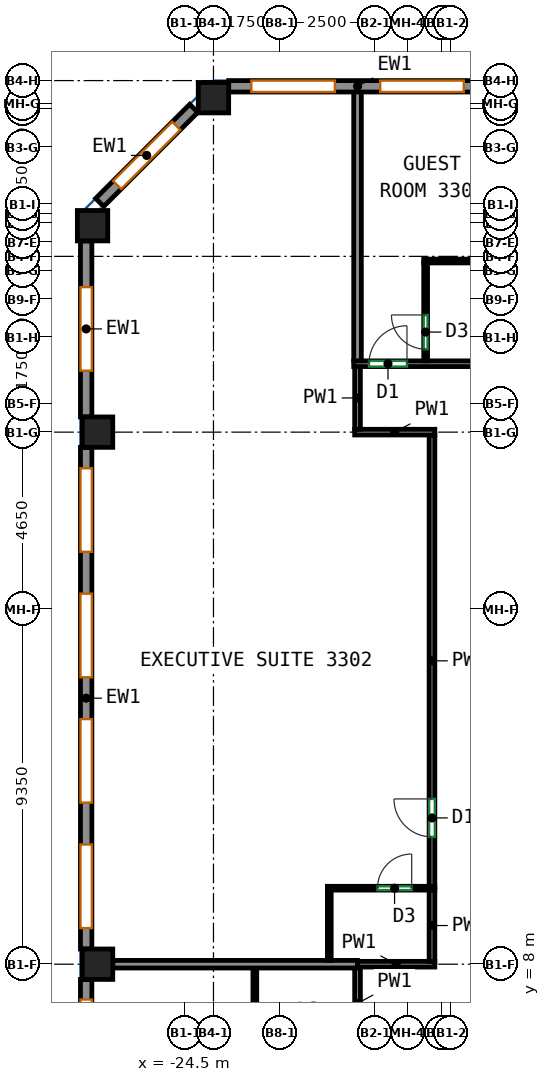
"""IFC4 building model, lengths in metres.
Left out: names, types, materials, properties, quantities, classifications, styles, units other than length and angle.
Written with IfcOpenShell. Run it as: python <this file> out.ifc"""

import sys

from ifc_helpers import new_model, si_unit, direction, frame, frame_2d, origin, origin_2d, place, context, subcontext, project, spatial, rectangle, extrude, source, transform, mapped, element, fill, save


model = new_model("IFC4")
c1 = context("Model", 3, precision=1e-05, world=origin(), true_north=direction((0.0, 1.0)))
c2 = subcontext(c1, "Body", "Model", "MODEL_VIEW")
j1 = project(units=[si_unit("LENGTHUNIT", "METRE"), si_unit("PLANEANGLEUNIT", "RADIAN")], contexts=[c1])
p1 = place(None, origin())
s1 = spatial("IfcSite", under=j1, at=p1, CompositionType="ELEMENT")
p2 = place(p1, origin())
s2 = spatial("IfcBuilding", under=s1, at=p2, CompositionType="ELEMENT")
p3 = place(p2, frame((0.0, 0.0, 147.3)))
s3 = spatial("IfcBuildingStorey", under=s2, at=p3, CompositionType="ELEMENT", Elevation=147.3)
m1 = source(origin(), c2, "Body", "SweptSolid", [
    extrude(rectangle(XDim=0.8, YDim=0.8, at=origin_2d()), origin(), (0.0, 0.0, 1.0), 3.12),
])
for number, where, z_axis, x_axis in (
    (1, (-26.932, 27.432, 0.0), (0.0, 0.0, 1.0), (1.0, 0.0, 0.0)),
    (2, (-26.8, 8.0, 0.0), (0.0, 0.0, 1.0), (1.0, 0.0, 0.0)),
    (3, (-26.8, 22.0, 0.0), (0.0, 0.0, 1.0), (1.0, 0.0, 0.0)),
    (4, (-23.75, 30.8, 0.0), (0.0, 0.0, 1.0), (1.0, 0.0, 0.0)),
):
    element("IfcColumn", number, at=place(p3, frame(where, z_axis=z_axis, x_axis=x_axis)), inside=s3, PredefinedType="COLUMN", context=c2, shape_type="MappedRepresentation", body=[
        mapped(m1, transform((0.0, 0.0, 0.0))),
    ])
m2 = source(origin(), c2, "Body", "SweptSolid", [
    extrude(rectangle(XDim=6.783, YDim=0.3, at=frame_2d((3.392, 0.0))), origin(), (0.0, 0.0, 1.0), 3.12),
])
p4 = place(p3, frame((-16.567, 31.1, 0.0), z_axis=(0.0, 0.0, 1.0), x_axis=(-1.0, 0.0, 0.0)))
e5 = element("IfcWall", 5, at=p4, inside=s3, PredefinedType="SOLIDWALL", context=c2, shape_type="MappedRepresentation", body=[
    mapped(m2, transform((0.0, 0.0, 0.0))),
])
p5 = place(p4, frame((0.596, 0.0, 0.85)))
e6 = element("IfcOpeningElement", 6, at=p5, cuts=e5, PredefinedType="OPENING", context=c2, shape_type="SweptSolid", body=[
    extrude(rectangle(XDim=2.2, YDim=1.95, at=frame_2d((1.1, 0.975))), frame((0.0, 0.16, 0.0), z_axis=(0.0, -1.0, 0.0), x_axis=(1.0, 0.0, 0.0)), (0.0, 0.0, 1.0), 0.32),
])
p6 = place(p4, frame((3.988, 0.0, 0.85)))
e7 = element("IfcOpeningElement", 7, at=p6, cuts=e5, PredefinedType="OPENING", context=c2, shape_type="SweptSolid", body=[
    extrude(rectangle(XDim=2.2, YDim=1.95, at=frame_2d((1.1, 0.975))), frame((0.0, 0.16, 0.0), z_axis=(0.0, -1.0, 0.0), x_axis=(1.0, 0.0, 0.0)), (0.0, 0.0, 1.0), 0.32),
])
m3 = source(origin(), c2, "Body", "SweptSolid", [
    extrude(rectangle(XDim=3.5, YDim=0.3, at=frame_2d((1.75, 0.0))), origin(), (0.0, 0.0, 1.0), 3.12),
])
p7 = place(p3, frame((-24.269, 30.519, 0.0), z_axis=(0.0, 0.0, 1.0), x_axis=(-0.707141656123, -0.70707190453, 0.0)))
e8 = element("IfcWall", 8, at=p7, inside=s3, PredefinedType="SOLIDWALL", context=c2, shape_type="MappedRepresentation", body=[
    mapped(m3, transform((0.0, 0.0, 0.0))),
])
p8 = place(p7, frame((0.65, 0.0, 0.85)))
e9 = element("IfcOpeningElement", 9, at=p8, cuts=e8, PredefinedType="OPENING", context=c2, shape_type="SweptSolid", body=[
    extrude(rectangle(XDim=2.2, YDim=1.95, at=frame_2d((1.1, 0.975))), frame((0.0, 0.16, 0.0), z_axis=(0.0, -1.0, 0.0), x_axis=(1.0, 0.0, 0.0)), (0.0, 0.0, 1.0), 0.32),
])
m4 = source(origin(), c2, "Body", "SweptSolid", [
    extrude(rectangle(XDim=4.632, YDim=0.3, at=frame_2d((2.316, 0.0))), origin(), (0.0, 0.0, 1.0), 3.12),
])
p9 = place(p3, frame((-27.1, 27.032, 0.0), z_axis=(0.0, 0.0, 1.0), x_axis=(0.0, -1.0, 0.0)))
e10 = element("IfcWall", 10, at=p9, inside=s3, PredefinedType="SOLIDWALL", context=c2, shape_type="MappedRepresentation", body=[
    mapped(m4, transform((0.0, 0.0, 0.0))),
])
p10 = place(p9, frame((1.216, 0.0, 0.85)))
e11 = element("IfcOpeningElement", 11, at=p10, cuts=e10, PredefinedType="OPENING", context=c2, shape_type="SweptSolid", body=[
    extrude(rectangle(XDim=2.2, YDim=1.95, at=frame_2d((1.1, 0.975))), frame((0.0, 0.16, 0.0), z_axis=(0.0, -1.0, 0.0), x_axis=(1.0, 0.0, 0.0)), (0.0, 0.0, 1.0), 0.32),
])
m5 = source(origin(), c2, "Body", "SweptSolid", [
    extrude(rectangle(XDim=13.2, YDim=0.3, at=frame_2d((6.6, 0.0))), origin(), (0.0, 0.0, 1.0), 3.12),
])
p11 = place(p3, frame((-27.1, 21.6, 0.0), z_axis=(0.0, 0.0, 1.0), x_axis=(0.0, -1.0, 0.0)))
e12 = element("IfcWall", 12, at=p11, inside=s3, PredefinedType="SOLIDWALL", context=c2, shape_type="MappedRepresentation", body=[
    mapped(m5, transform((0.0, 0.0, 0.0))),
])
p12 = place(p11, frame((0.55, 0.0, 0.85)))
e13 = element("IfcOpeningElement", 13, at=p12, cuts=e12, PredefinedType="OPENING", context=c2, shape_type="SweptSolid", body=[
    extrude(rectangle(XDim=2.2, YDim=1.95, at=frame_2d((1.1, 0.975))), frame((0.0, 0.16, 0.0), z_axis=(0.0, -1.0, 0.0), x_axis=(1.0, 0.0, 0.0)), (0.0, 0.0, 1.0), 0.32),
])
p13 = place(p11, frame((3.85, 0.0, 0.85)))
e14 = element("IfcOpeningElement", 14, at=p13, cuts=e12, PredefinedType="OPENING", context=c2, shape_type="SweptSolid", body=[
    extrude(rectangle(XDim=2.2, YDim=1.95, at=frame_2d((1.1, 0.975))), frame((0.0, 0.16, 0.0), z_axis=(0.0, -1.0, 0.0), x_axis=(1.0, 0.0, 0.0)), (0.0, 0.0, 1.0), 0.32),
])
p14 = place(p11, frame((7.15, 0.0, 0.85)))
e15 = element("IfcOpeningElement", 15, at=p14, cuts=e12, PredefinedType="OPENING", context=c2, shape_type="SweptSolid", body=[
    extrude(rectangle(XDim=2.2, YDim=1.95, at=frame_2d((1.1, 0.975))), frame((0.0, 0.16, 0.0), z_axis=(0.0, -1.0, 0.0), x_axis=(1.0, 0.0, 0.0)), (0.0, 0.0, 1.0), 0.32),
])
p15 = place(p11, frame((10.45, 0.0, 0.85)))
e16 = element("IfcOpeningElement", 16, at=p15, cuts=e12, PredefinedType="OPENING", context=c2, shape_type="SweptSolid", body=[
    extrude(rectangle(XDim=2.2, YDim=1.95, at=frame_2d((1.1, 0.975))), frame((0.0, 0.16, 0.0), z_axis=(0.0, -1.0, 0.0), x_axis=(1.0, 0.0, 0.0)), (0.0, 0.0, 1.0), 0.32),
])
m6 = source(origin(), c2, "Body", "SweptSolid", [
    extrude(rectangle(XDim=6.513, YDim=0.3, at=frame_2d((3.256, 0.0))), origin(), (0.0, 0.0, 1.0), 3.12),
])
p16 = place(p3, frame((-27.1, 7.6, 0.0), z_axis=(0.0, 0.0, 1.0), x_axis=(0.0, -1.0, 0.0)))
e17 = element("IfcWall", 17, at=p16, inside=s3, PredefinedType="SOLIDWALL", context=c2, shape_type="MappedRepresentation", body=[
    mapped(m6, transform((0.0, 0.0, 0.0))),
])
p17 = place(p16, frame((0.528, 0.0, 0.85)))
e18 = element("IfcOpeningElement", 18, at=p17, cuts=e17, PredefinedType="OPENING", context=c2, shape_type="SweptSolid", body=[
    extrude(rectangle(XDim=2.2, YDim=1.95, at=frame_2d((1.1, 0.975))), frame((0.0, 0.16, 0.0), z_axis=(0.0, -1.0, 0.0), x_axis=(1.0, 0.0, 0.0)), (0.0, 0.0, 1.0), 0.32),
])
p18 = place(p16, frame((3.784, 0.0, 0.85)))
e19 = element("IfcOpeningElement", 19, at=p18, cuts=e17, PredefinedType="OPENING", context=c2, shape_type="SweptSolid", body=[
    extrude(rectangle(XDim=2.2, YDim=1.95, at=frame_2d((1.1, 0.975))), frame((0.0, 0.16, 0.0), z_axis=(0.0, -1.0, 0.0), x_axis=(1.0, 0.0, 0.0)), (0.0, 0.0, 1.0), 0.32),
])
p19 = place(p3, frame((-19.959, 6.04, 0.0), z_axis=(0.0, 0.0, 1.0), x_axis=(0.0, 1.0, 0.0)))
e20 = element("IfcWall", 20, at=p19, inside=s3, PredefinedType="PARTITIONING", context=c2, shape_type="SweptSolid", body=[
    extrude(rectangle(XDim=1.86, YDim=0.15, at=frame_2d((0.93, 0.0))), origin(), (0.0, 0.0, 1.0), 3.12),
])
p20 = place(p3, frame((-18.0, 10.04, 0.0), z_axis=(0.0, 0.0, 1.0), x_axis=(0.0, 1.0, 0.0)))
e21 = element("IfcWall", 21, at=p20, inside=s3, PredefinedType="PARTITIONING", context=c2, shape_type="SweptSolid", body=[
    extrude(rectangle(XDim=11.885, YDim=0.15, at=frame_2d((5.942, 0.0))), origin(), (0.0, 0.0, 1.0), 3.12),
])
p21 = place(p20, frame((1.309, 0.0, 0.0)))
e22 = element("IfcOpeningElement", 22, at=p21, cuts=e21, PredefinedType="OPENING", context=c2, shape_type="SweptSolid", body=[
    extrude(rectangle(XDim=1.0, YDim=2.1, at=frame_2d((0.5, 1.05))), frame((0.0, 0.085, 0.0), z_axis=(0.0, -1.0, 0.0), x_axis=(1.0, 0.0, 0.0)), (0.0, 0.0, 1.0), 0.17),
])
p22 = place(p3, frame((-20.034, 22.0, 0.0), z_axis=(0.0, 0.0, 1.0), x_axis=(1.0, 0.0, 0.0)))
e23 = element("IfcWall", 23, at=p22, inside=s3, PredefinedType="PARTITIONING", context=c2, shape_type="SweptSolid", body=[
    extrude(rectangle(XDim=2.109, YDim=0.15, at=frame_2d((1.054, 0.0))), origin(), (0.0, 0.0, 1.0), 3.12),
])
p23 = place(p3, frame((-19.959, 22.075, 0.0), z_axis=(0.0, 0.0, 1.0), x_axis=(0.0, 1.0, 0.0)))
e24 = element("IfcWall", 24, at=p23, inside=s3, PredefinedType="PARTITIONING", context=c2, shape_type="SweptSolid", body=[
    extrude(rectangle(XDim=1.65, YDim=0.15, at=frame_2d((0.825, 0.0))), origin(), (0.0, 0.0, 1.0), 3.12),
])
p24 = place(p3, frame((-17.925, 8.0, 0.0), z_axis=(0.0, 0.0, 1.0), x_axis=(-1.0, 0.0, 0.0)))
e25 = element("IfcWall", 25, at=p24, inside=s3, PredefinedType="PARTITIONING", context=c2, shape_type="SweptSolid", body=[
    extrude(rectangle(XDim=2.034, YDim=0.15, at=frame_2d((1.017, 0.0))), origin(), (0.0, 0.0, 1.0), 3.12),
])
p25 = place(p3, frame((-18.0, 8.075, 0.0), z_axis=(0.0, 0.0, 1.0), x_axis=(0.0, 1.0, 0.0)))
e26 = element("IfcWall", 26, at=p25, inside=s3, PredefinedType="PARTITIONING", context=c2, shape_type="SweptSolid", body=[
    extrude(rectangle(XDim=1.885, YDim=0.15, at=frame_2d((0.942, 0.0))), origin(), (0.0, 0.0, 1.0), 3.12),
])
p26 = place(p3, frame((-20.059, 23.8, 0.0), z_axis=(0.0, 0.0, 1.0), x_axis=(1.0, 0.0, 0.0)))
e27 = element("IfcWall", 27, at=p26, inside=s3, PredefinedType="PARTITIONING", context=c2, shape_type="SweptSolid", body=[
    extrude(rectangle(XDim=41.909, YDim=0.15, at=frame_2d((20.955, 0.0))), origin(), (0.0, 0.0, 1.0), 3.12),
])
p27 = place(p26, frame((0.401, 0.0, 0.0)))
e28 = element("IfcOpeningElement", 28, at=p27, cuts=e27, PredefinedType="OPENING", context=c2, shape_type="SweptSolid", body=[
    extrude(rectangle(XDim=1.0, YDim=2.1, at=frame_2d((0.5, 1.05))), frame((0.0, 0.085, 0.0), z_axis=(0.0, -1.0, 0.0), x_axis=(1.0, 0.0, 0.0)), (0.0, 0.0, 1.0), 0.17),
])
p28 = place(p26, frame((6.082, 0.0, 0.0)))
e29 = element("IfcOpeningElement", 29, at=p28, cuts=e27, PredefinedType="OPENING", context=c2, shape_type="SweptSolid", body=[
    extrude(rectangle(XDim=1.0, YDim=2.1, at=frame_2d((0.5, 1.05))), frame((0.0, 0.085, 0.0), z_axis=(0.0, -1.0, 0.0), x_axis=(1.0, 0.0, 0.0)), (0.0, 0.0, 1.0), 0.17),
])
p29 = place(p26, frame((8.08, 0.0, 0.0)))
e30 = element("IfcOpeningElement", 30, at=p29, cuts=e27, PredefinedType="OPENING", context=c2, shape_type="SweptSolid", body=[
    extrude(rectangle(XDim=1.0, YDim=2.1, at=frame_2d((0.5, 1.05))), frame((0.0, 0.085, 0.0), z_axis=(0.0, -1.0, 0.0), x_axis=(1.0, 0.0, 0.0)), (0.0, 0.0, 1.0), 0.17),
])
p30 = place(p26, frame((13.769, 0.0, 0.0)))
e31 = element("IfcOpeningElement", 31, at=p30, cuts=e27, PredefinedType="OPENING", context=c2, shape_type="SweptSolid", body=[
    extrude(rectangle(XDim=1.0, YDim=2.1, at=frame_2d((0.5, 1.05))), frame((0.0, 0.085, 0.0), z_axis=(0.0, -1.0, 0.0), x_axis=(1.0, 0.0, 0.0)), (0.0, 0.0, 1.0), 0.17),
])
p31 = place(p26, frame((15.56, 0.0, 0.0)))
e32 = element("IfcOpeningElement", 32, at=p31, cuts=e27, PredefinedType="OPENING", context=c2, shape_type="SweptSolid", body=[
    extrude(rectangle(XDim=1.0, YDim=2.1, at=frame_2d((0.5, 1.05))), frame((0.0, 0.085, 0.0), z_axis=(0.0, -1.0, 0.0), x_axis=(1.0, 0.0, 0.0)), (0.0, 0.0, 1.0), 0.17),
])
p32 = place(p26, frame((21.625, 0.0, 0.0)))
e33 = element("IfcOpeningElement", 33, at=p32, cuts=e27, PredefinedType="OPENING", context=c2, shape_type="SweptSolid", body=[
    extrude(rectangle(XDim=1.0, YDim=2.1, at=frame_2d((0.5, 1.05))), frame((0.0, 0.085, 0.0), z_axis=(0.0, -1.0, 0.0), x_axis=(1.0, 0.0, 0.0)), (0.0, 0.0, 1.0), 0.17),
])
p33 = place(p26, frame((23.212, 0.0, 0.0)))
e34 = element("IfcOpeningElement", 34, at=p33, cuts=e27, PredefinedType="OPENING", context=c2, shape_type="SweptSolid", body=[
    extrude(rectangle(XDim=1.0, YDim=2.1, at=frame_2d((0.5, 1.05))), frame((0.0, 0.085, 0.0), z_axis=(0.0, -1.0, 0.0), x_axis=(1.0, 0.0, 0.0)), (0.0, 0.0, 1.0), 0.17),
])
p34 = place(p26, frame((29.038, 0.0, 0.0)))
e35 = element("IfcOpeningElement", 35, at=p34, cuts=e27, PredefinedType="OPENING", context=c2, shape_type="SweptSolid", body=[
    extrude(rectangle(XDim=1.0, YDim=2.1, at=frame_2d((0.5, 1.05))), frame((0.0, 0.085, 0.0), z_axis=(0.0, -1.0, 0.0), x_axis=(1.0, 0.0, 0.0)), (0.0, 0.0, 1.0), 0.17),
])
p35 = place(p26, frame((30.624, 0.0, 0.0)))
e36 = element("IfcOpeningElement", 36, at=p35, cuts=e27, PredefinedType="OPENING", context=c2, shape_type="SweptSolid", body=[
    extrude(rectangle(XDim=1.0, YDim=2.1, at=frame_2d((0.5, 1.05))), frame((0.0, 0.085, 0.0), z_axis=(0.0, -1.0, 0.0), x_axis=(1.0, 0.0, 0.0)), (0.0, 0.0, 1.0), 0.17),
])
p36 = place(p26, frame((36.622, 0.0, 0.0)))
e37 = element("IfcOpeningElement", 37, at=p36, cuts=e27, PredefinedType="OPENING", context=c2, shape_type="SweptSolid", body=[
    extrude(rectangle(XDim=1.0, YDim=2.1, at=frame_2d((0.5, 1.05))), frame((0.0, 0.085, 0.0), z_axis=(0.0, -1.0, 0.0), x_axis=(1.0, 0.0, 0.0)), (0.0, 0.0, 1.0), 0.17),
])
p37 = place(p26, frame((38.516, 0.0, 0.0)))
e38 = element("IfcOpeningElement", 38, at=p37, cuts=e27, PredefinedType="OPENING", context=c2, shape_type="SweptSolid", body=[
    extrude(rectangle(XDim=1.0, YDim=2.1, at=frame_2d((0.5, 1.05))), frame((0.0, 0.085, 0.0), z_axis=(0.0, -1.0, 0.0), x_axis=(1.0, 0.0, 0.0)), (0.0, 0.0, 1.0), 0.17),
])
p38 = place(p3, frame((-22.661, 6.05, 0.0), z_axis=(0.0, 0.0, 1.0), x_axis=(0.0, 1.0, 0.0)))
e39 = element("IfcWall", 39, at=p38, inside=s3, PredefinedType="PARTITIONING", context=c2, shape_type="SweptSolid", body=[
    extrude(rectangle(XDim=1.85, YDim=0.1, at=frame_2d((0.925, 0.0))), origin(), (0.0, 0.0, 1.0), 3.12),
])
p39 = place(p3, frame((-26.4, 8.0, 0.0), z_axis=(0.0, 0.0, 1.0), x_axis=(1.0, 0.0, 0.0)))
e40 = element("IfcWall", 40, at=p39, inside=s3, PredefinedType="PARTITIONING", context=c2, shape_type="SweptSolid", body=[
    extrude(rectangle(XDim=6.439, YDim=0.2, at=frame_2d((3.219, 0.0))), origin(), (0.0, 0.0, 1.0), 3.12),
])
p40 = place(p3, frame((-20.752, 10.0, 0.0), z_axis=(0.0, 0.0, 1.0), x_axis=(1.0, 0.0, 0.0)))
e41 = element("IfcWall", 41, at=p40, inside=s3, PredefinedType="PARTITIONING", context=c2, shape_type="SweptSolid", body=[
    extrude(rectangle(XDim=2.825, YDim=0.1, at=frame_2d((1.413, 0.0))), origin(), (0.0, 0.0, 1.0), 3.12),
])
p41 = place(p40, frame((1.318, 0.0, 0.0)))
e42 = element("IfcOpeningElement", 42, at=p41, cuts=e41, PredefinedType="OPENING", context=c2, shape_type="SweptSolid", body=[
    extrude(rectangle(XDim=0.9, YDim=2.1, at=frame_2d((0.45, 1.05))), frame((0.0, 0.06, 0.0), z_axis=(0.0, -1.0, 0.0), x_axis=(1.0, 0.0, 0.0)), (0.0, 0.0, 1.0), 0.12),
])
p42 = place(p3, frame((-20.702, 8.1, 0.0), z_axis=(0.0, 0.0, 1.0), x_axis=(0.0, 1.0, 0.0)))
e43 = element("IfcWall", 43, at=p42, inside=s3, PredefinedType="PARTITIONING", context=c2, shape_type="SweptSolid", body=[
    extrude(rectangle(XDim=1.85, YDim=0.1, at=frame_2d((0.925, 0.0))), origin(), (0.0, 0.0, 1.0), 3.12),
])
p43 = place(p3, frame((-19.959, 23.877, 0.0), z_axis=(0.0, 0.0, 1.0), x_axis=(0.0, 1.0, 0.0)))
e44 = element("IfcWall", 44, at=p43, inside=s3, PredefinedType="PARTITIONING", context=c2, shape_type="SweptSolid", body=[
    extrude(rectangle(XDim=7.123, YDim=0.2, at=frame_2d((3.562, 0.0))), origin(), (0.0, 0.0, 1.0), 3.12),
])
p44 = place(p3, frame((-18.217, 26.502, 0.0), z_axis=(0.0, 0.0, 1.0), x_axis=(1.0, 0.0, 0.0)))
e45 = element("IfcWall", 45, at=p44, inside=s3, PredefinedType="PARTITIONING", context=c2, shape_type="SweptSolid", body=[
    extrude(rectangle(XDim=1.5, YDim=0.1, at=frame_2d((0.75, 0.0))), origin(), (0.0, 0.0, 1.0), 3.12),
])
p45 = place(p3, frame((-18.167, 23.877, 0.0), z_axis=(0.0, 0.0, 1.0), x_axis=(0.0, 1.0, 0.0)))
e46 = element("IfcWall", 46, at=p45, inside=s3, PredefinedType="PARTITIONING", context=c2, shape_type="SweptSolid", body=[
    extrude(rectangle(XDim=2.575, YDim=0.1, at=frame_2d((1.288, 0.0))), origin(), (0.0, 0.0, 1.0), 3.12),
])
p46 = place(p45, frame((0.306, 0.0, 0.0)))
e47 = element("IfcOpeningElement", 47, at=p46, cuts=e46, PredefinedType="OPENING", context=c2, shape_type="SweptSolid", body=[
    extrude(rectangle(XDim=0.9, YDim=2.1, at=frame_2d((0.45, 1.05))), frame((0.0, 0.06, 0.0), z_axis=(0.0, -1.0, 0.0), x_axis=(1.0, 0.0, 0.0)), (0.0, 0.0, 1.0), 0.12),
])
p47 = place(p5, origin())
e48 = element("IfcWindow", 48, at=p47, inside=s3, PartitioningType="SINGLE_PANEL", PredefinedType="WINDOW", context=c2, shape_type="SweptSolid", body=[
    extrude(rectangle(XDim=2.2, YDim=1.95, at=frame_2d((1.1, 0.975))), frame((0.0, 0.03, 0.0), z_axis=(0.0, -1.0, 0.0), x_axis=(1.0, 0.0, 0.0)), (0.0, 0.0, 1.0), 0.06),
])
fill(e6, e48)
p48 = place(p6, origin())
e49 = element("IfcWindow", 49, at=p48, inside=s3, PartitioningType="SINGLE_PANEL", PredefinedType="WINDOW", context=c2, shape_type="SweptSolid", body=[
    extrude(rectangle(XDim=2.2, YDim=1.95, at=frame_2d((1.1, 0.975))), frame((0.0, 0.03, 0.0), z_axis=(0.0, -1.0, 0.0), x_axis=(1.0, 0.0, 0.0)), (0.0, 0.0, 1.0), 0.06),
])
fill(e7, e49)
p49 = place(p8, origin())
e50 = element("IfcWindow", 50, at=p49, inside=s3, PartitioningType="SINGLE_PANEL", PredefinedType="WINDOW", context=c2, shape_type="SweptSolid", body=[
    extrude(rectangle(XDim=2.2, YDim=1.95, at=frame_2d((1.1, 0.975))), frame((0.0, 0.03, 0.0), z_axis=(0.0, -1.0, 0.0), x_axis=(1.0, 0.0, 0.0)), (0.0, 0.0, 1.0), 0.06),
])
fill(e9, e50)
p50 = place(p10, origin())
e51 = element("IfcWindow", 51, at=p50, inside=s3, PartitioningType="SINGLE_PANEL", PredefinedType="WINDOW", context=c2, shape_type="SweptSolid", body=[
    extrude(rectangle(XDim=2.2, YDim=1.95, at=frame_2d((1.1, 0.975))), frame((0.0, 0.03, 0.0), z_axis=(0.0, -1.0, 0.0), x_axis=(1.0, 0.0, 0.0)), (0.0, 0.0, 1.0), 0.06),
])
fill(e11, e51)
p51 = place(p12, origin())
e52 = element("IfcWindow", 52, at=p51, inside=s3, PartitioningType="SINGLE_PANEL", PredefinedType="WINDOW", context=c2, shape_type="SweptSolid", body=[
    extrude(rectangle(XDim=2.2, YDim=1.95, at=frame_2d((1.1, 0.975))), frame((0.0, 0.03, 0.0), z_axis=(0.0, -1.0, 0.0), x_axis=(1.0, 0.0, 0.0)), (0.0, 0.0, 1.0), 0.06),
])
fill(e13, e52)
p52 = place(p13, origin())
e53 = element("IfcWindow", 53, at=p52, inside=s3, PartitioningType="SINGLE_PANEL", PredefinedType="WINDOW", context=c2, shape_type="SweptSolid", body=[
    extrude(rectangle(XDim=2.2, YDim=1.95, at=frame_2d((1.1, 0.975))), frame((0.0, 0.03, 0.0), z_axis=(0.0, -1.0, 0.0), x_axis=(1.0, 0.0, 0.0)), (0.0, 0.0, 1.0), 0.06),
])
fill(e14, e53)
p53 = place(p14, origin())
e54 = element("IfcWindow", 54, at=p53, inside=s3, PartitioningType="SINGLE_PANEL", PredefinedType="WINDOW", context=c2, shape_type="SweptSolid", body=[
    extrude(rectangle(XDim=2.2, YDim=1.95, at=frame_2d((1.1, 0.975))), frame((0.0, 0.03, 0.0), z_axis=(0.0, -1.0, 0.0), x_axis=(1.0, 0.0, 0.0)), (0.0, 0.0, 1.0), 0.06),
])
fill(e15, e54)
p54 = place(p15, origin())
e55 = element("IfcWindow", 55, at=p54, inside=s3, PartitioningType="SINGLE_PANEL", PredefinedType="WINDOW", context=c2, shape_type="SweptSolid", body=[
    extrude(rectangle(XDim=2.2, YDim=1.95, at=frame_2d((1.1, 0.975))), frame((0.0, 0.03, 0.0), z_axis=(0.0, -1.0, 0.0), x_axis=(1.0, 0.0, 0.0)), (0.0, 0.0, 1.0), 0.06),
])
fill(e16, e55)
p55 = place(p17, origin())
e56 = element("IfcWindow", 56, at=p55, inside=s3, PartitioningType="SINGLE_PANEL", PredefinedType="WINDOW", context=c2, shape_type="SweptSolid", body=[
    extrude(rectangle(XDim=2.2, YDim=1.95, at=frame_2d((1.1, 0.975))), frame((0.0, 0.03, 0.0), z_axis=(0.0, -1.0, 0.0), x_axis=(1.0, 0.0, 0.0)), (0.0, 0.0, 1.0), 0.06),
])
fill(e18, e56)
p56 = place(p41, origin())
e57 = element("IfcDoor", 57, at=p56, inside=s3, OperationType="SINGLE_SWING_RIGHT", PredefinedType="DOOR", context=c2, shape_type="SweptSolid", body=[
    extrude(rectangle(XDim=0.9, YDim=2.1, at=frame_2d((0.45, 1.05))), frame((0.0, 0.025, 0.0), z_axis=(0.0, -1.0, 0.0), x_axis=(1.0, 0.0, 0.0)), (0.0, 0.0, 1.0), 0.05),
])
fill(e42, e57)
p57 = place(p21, origin())
e58 = element("IfcDoor", 58, at=p57, inside=s3, OperationType="SINGLE_SWING_RIGHT", PredefinedType="DOOR", context=c2, shape_type="SweptSolid", body=[
    extrude(rectangle(XDim=1.0, YDim=2.1, at=frame_2d((0.5, 1.05))), frame((0.0, 0.025, 0.0), z_axis=(0.0, -1.0, 0.0), x_axis=(1.0, 0.0, 0.0)), (0.0, 0.0, 1.0), 0.05),
])
fill(e22, e58)
p58 = place(p27, origin())
e59 = element("IfcDoor", 59, at=p58, inside=s3, OperationType="SINGLE_SWING_RIGHT", PredefinedType="DOOR", context=c2, shape_type="SweptSolid", body=[
    extrude(rectangle(XDim=1.0, YDim=2.1, at=frame_2d((0.5, 1.05))), frame((0.0, 0.025, 0.0), z_axis=(0.0, -1.0, 0.0), x_axis=(1.0, 0.0, 0.0)), (0.0, 0.0, 1.0), 0.05),
])
fill(e28, e59)
p59 = place(p46, origin())
e60 = element("IfcDoor", 60, at=p59, inside=s3, OperationType="SINGLE_SWING_RIGHT", PredefinedType="DOOR", context=c2, shape_type="SweptSolid", body=[
    extrude(rectangle(XDim=0.9, YDim=2.1, at=frame_2d((0.45, 1.05))), frame((0.0, 0.025, 0.0), z_axis=(0.0, -1.0, 0.0), x_axis=(1.0, 0.0, 0.0)), (0.0, 0.0, 1.0), 0.05),
])
fill(e47, e60)
save(model, sys.argv[1])
